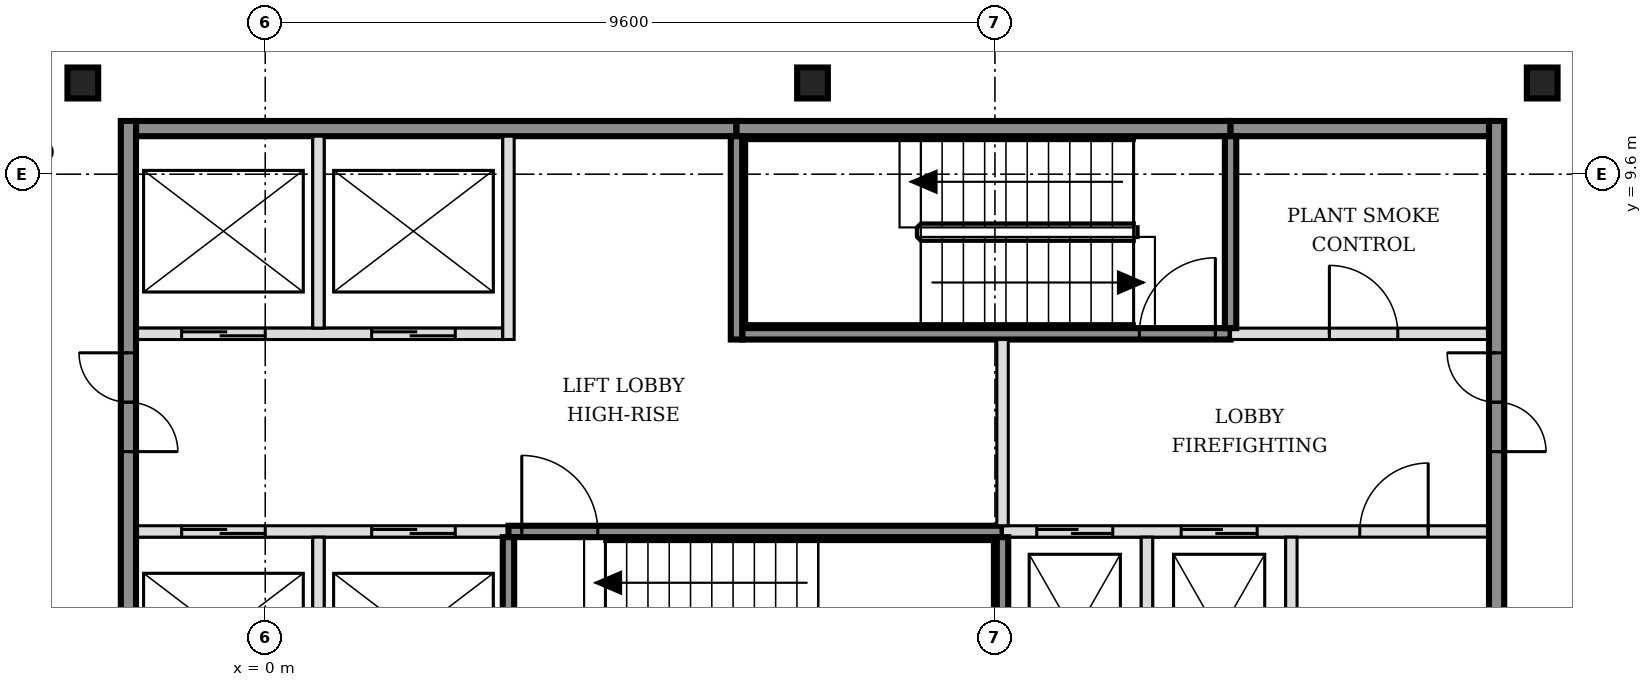
"""IFC4 building model, lengths in metres.
Left out: names, types, materials, properties, quantities, classifications, styles, units other than length and angle.
Written with IfcOpenShell. Run it as: python <this file> out.ifc"""

import sys

from ifc_helpers import new_model, si_unit, direction, frame, frame_2d, origin, origin_2d, place, context, subcontext, project, spatial, rectangle, i_section, extrude, element, fill, save


model = new_model("IFC4")
c1 = context("Model", 3, precision=1e-05, world=origin(), true_north=direction((0.0, 1.0)))
c2 = subcontext(c1, "Body", "Model", "MODEL_VIEW")
j1 = project(units=[si_unit("LENGTHUNIT", "METRE"), si_unit("PLANEANGLEUNIT", "RADIAN")], contexts=[c1])
p1 = place(None, origin())
s1 = spatial("IfcSite", under=j1, at=p1, CompositionType="ELEMENT")
p2 = place(p1, origin())
s2 = spatial("IfcBuilding", under=s1, at=p2, CompositionType="ELEMENT")
p3 = place(p2, frame((0.0, 0.0, 232.2)))
s3 = spatial("IfcBuildingStorey", under=s2, at=p3, CompositionType="ELEMENT", Elevation=232.2)
for number, where, z_axis, x_axis in (
    (1, (-2.4, 10.8, -0.15), (0.0, 0.0, 1.0), (1.0, 0.0, 0.0)),
    (2, (7.2, 10.8, -0.15), (0.0, 0.0, 1.0), (1.0, 0.0, 0.0)),
    (3, (16.8, 10.8, -0.15), (0.0, 0.0, 1.0), (1.0, 0.0, 0.0)),
):
    element("IfcColumn", number, at=place(p3, frame(where, z_axis=z_axis, x_axis=x_axis)), inside=s3, PredefinedType="COLUMN", context=c2, shape_type="SweptSolid", body=[
        extrude(i_section(OverallWidth=0.404, OverallDepth=0.407, WebThickness=0.027, FlangeThickness=0.044, FilletRadius=0.015, at=origin_2d()), origin(), (0.0, 0.0, 1.0), 3.6),
    ])
p4 = place(p3, frame((-1.7, 4.9, 0.0), z_axis=(0.0, 0.0, 1.0), x_axis=(1.0, 0.0, 0.0)))
e4 = element("IfcWall", 4, at=p4, inside=s3, PredefinedType="SOLIDWALL", context=c2, shape_type="SweptSolid", body=[
    extrude(rectangle(XDim=4.9, YDim=0.15, at=frame_2d((2.45, 0.0))), origin(), (0.0, 0.0, 1.0), 3.45),
])
p5 = place(p4, frame((0.6, 0.0, 0.0)))
e5 = element("IfcOpeningElement", 5, at=p5, cuts=e4, PredefinedType="OPENING", context=c2, shape_type="SweptSolid", body=[
    extrude(rectangle(XDim=1.1, YDim=2.1, at=frame_2d((0.55, 1.05))), frame((0.0, 0.085, 0.0), z_axis=(0.0, -1.0, 0.0), x_axis=(1.0, 0.0, 0.0)), (0.0, 0.0, 1.0), 0.17),
])
p6 = place(p4, frame((3.1, 0.0, 0.0)))
e6 = element("IfcOpeningElement", 6, at=p6, cuts=e4, PredefinedType="OPENING", context=c2, shape_type="SweptSolid", body=[
    extrude(rectangle(XDim=1.1, YDim=2.1, at=frame_2d((0.55, 1.05))), frame((0.0, 0.085, 0.0), z_axis=(0.0, -1.0, 0.0), x_axis=(1.0, 0.0, 0.0)), (0.0, 0.0, 1.0), 0.17),
])
p7 = place(p3, frame((3.2, 4.9, 0.0), z_axis=(0.0, 0.0, 1.0), x_axis=(1.0, 0.0, 0.0)))
e7 = element("IfcWall", 7, at=p7, inside=s3, PredefinedType="SOLIDWALL", context=c2, shape_type="SweptSolid", body=[
    extrude(rectangle(XDim=6.5, YDim=0.15, at=frame_2d((3.25, 0.0))), origin(), (0.0, 0.0, 1.0), 3.45),
])
p8 = place(p7, frame((0.175, 0.0, 0.0)))
e8 = element("IfcOpeningElement", 8, at=p8, cuts=e7, PredefinedType="OPENING", context=c2, shape_type="SweptSolid", body=[
    extrude(rectangle(XDim=1.0, YDim=2.1, at=frame_2d((0.5, 1.05))), frame((0.0, 0.085, 0.0), z_axis=(0.0, -1.0, 0.0), x_axis=(1.0, 0.0, 0.0)), (0.0, 0.0, 1.0), 0.17),
])
p9 = place(p3, frame((9.7, 4.9, 0.0), z_axis=(0.0, 0.0, 1.0), x_axis=(1.0, 0.0, 0.0)))
e9 = element("IfcWall", 9, at=p9, inside=s3, PredefinedType="SOLIDWALL", context=c2, shape_type="SweptSolid", body=[
    extrude(rectangle(XDim=6.4, YDim=0.15, at=frame_2d((3.2, 0.0))), origin(), (0.0, 0.0, 1.0), 3.45),
])
p10 = place(p9, frame((0.45, 0.0, 0.0)))
e10 = element("IfcOpeningElement", 10, at=p10, cuts=e9, PredefinedType="OPENING", context=c2, shape_type="SweptSolid", body=[
    extrude(rectangle(XDim=1.0, YDim=2.1, at=frame_2d((0.5, 1.05))), frame((0.0, 0.085, 0.0), z_axis=(0.0, -1.0, 0.0), x_axis=(1.0, 0.0, 0.0)), (0.0, 0.0, 1.0), 0.17),
])
p11 = place(p9, frame((2.35, 0.0, 0.0)))
e11 = element("IfcOpeningElement", 11, at=p11, cuts=e9, PredefinedType="OPENING", context=c2, shape_type="SweptSolid", body=[
    extrude(rectangle(XDim=1.0, YDim=2.1, at=frame_2d((0.5, 1.05))), frame((0.0, 0.085, 0.0), z_axis=(0.0, -1.0, 0.0), x_axis=(1.0, 0.0, 0.0)), (0.0, 0.0, 1.0), 0.17),
])
p12 = place(p9, frame((4.7, 0.0, 0.0)))
e12 = element("IfcOpeningElement", 12, at=p12, cuts=e9, PredefinedType="OPENING", context=c2, shape_type="SweptSolid", body=[
    extrude(rectangle(XDim=0.9, YDim=2.1, at=frame_2d((0.45, 1.05))), frame((0.0, 0.085, 0.0), z_axis=(0.0, -1.0, 0.0), x_axis=(1.0, 0.0, 0.0)), (0.0, 0.0, 1.0), 0.17),
])
p13 = place(p3, frame((-1.7, 7.5, 0.0), z_axis=(0.0, 0.0, 1.0), x_axis=(1.0, 0.0, 0.0)))
e13 = element("IfcWall", 13, at=p13, inside=s3, PredefinedType="SOLIDWALL", context=c2, shape_type="SweptSolid", body=[
    extrude(rectangle(XDim=4.825, YDim=0.15, at=frame_2d((2.413, 0.0))), origin(), (0.0, 0.0, 1.0), 3.45),
])
p14 = place(p13, frame((0.6, 0.0, 0.0)))
e14 = element("IfcOpeningElement", 14, at=p14, cuts=e13, PredefinedType="OPENING", context=c2, shape_type="SweptSolid", body=[
    extrude(rectangle(XDim=1.1, YDim=2.1, at=frame_2d((0.55, 1.05))), frame((0.0, 0.085, 0.0), z_axis=(0.0, -1.0, 0.0), x_axis=(1.0, 0.0, 0.0)), (0.0, 0.0, 1.0), 0.17),
])
p15 = place(p13, frame((3.1, 0.0, 0.0)))
e15 = element("IfcOpeningElement", 15, at=p15, cuts=e13, PredefinedType="OPENING", context=c2, shape_type="SweptSolid", body=[
    extrude(rectangle(XDim=1.1, YDim=2.1, at=frame_2d((0.55, 1.05))), frame((0.0, 0.085, 0.0), z_axis=(0.0, -1.0, 0.0), x_axis=(1.0, 0.0, 0.0)), (0.0, 0.0, 1.0), 0.17),
])
p16 = place(p3, frame((6.275, 7.5, 0.0), z_axis=(0.0, 0.0, 1.0), x_axis=(1.0, 0.0, 0.0)))
e16 = element("IfcWall", 16, at=p16, inside=s3, PredefinedType="SOLIDWALL", context=c2, shape_type="SweptSolid", body=[
    extrude(rectangle(XDim=6.425, YDim=0.15, at=frame_2d((3.212, 0.0))), origin(), (0.0, 0.0, 1.0), 3.45),
])
p17 = place(p16, frame((5.225, 0.0, 0.0)))
e17 = element("IfcOpeningElement", 17, at=p17, cuts=e16, PredefinedType="OPENING", context=c2, shape_type="SweptSolid", body=[
    extrude(rectangle(XDim=1.0, YDim=2.1, at=frame_2d((0.5, 1.05))), frame((0.0, 0.085, 0.0), z_axis=(0.0, -1.0, 0.0), x_axis=(1.0, 0.0, 0.0)), (0.0, 0.0, 1.0), 0.17),
])
p18 = place(p3, frame((12.7, 7.5, 0.0), z_axis=(0.0, 0.0, 1.0), x_axis=(1.0, 0.0, 0.0)))
e18 = element("IfcWall", 18, at=p18, inside=s3, PredefinedType="SOLIDWALL", context=c2, shape_type="SweptSolid", body=[
    extrude(rectangle(XDim=3.4, YDim=0.15, at=frame_2d((1.7, 0.0))), origin(), (0.0, 0.0, 1.0), 3.45),
])
p19 = place(p18, frame((1.3, 0.0, 0.0)))
e19 = element("IfcOpeningElement", 19, at=p19, cuts=e18, PredefinedType="OPENING", context=c2, shape_type="SweptSolid", body=[
    extrude(rectangle(XDim=0.9, YDim=2.1, at=frame_2d((0.45, 1.05))), frame((0.0, 0.085, 0.0), z_axis=(0.0, -1.0, 0.0), x_axis=(1.0, 0.0, 0.0)), (0.0, 0.0, 1.0), 0.17),
])
p20 = place(p3, frame((-1.7, 10.2, 0.0), z_axis=(0.0, 0.0, 1.0), x_axis=(1.0, 0.0, 0.0)))
e20 = element("IfcWall", 20, at=p20, inside=s3, PredefinedType="SOLIDWALL", context=c2, shape_type="SweptSolid", body=[
    extrude(rectangle(XDim=7.9, YDim=0.2, at=frame_2d((3.95, 0.0))), origin(), (0.0, 0.0, 1.0), 3.45),
])
p21 = place(p3, frame((6.2, 10.2, 0.0), z_axis=(0.0, 0.0, 1.0), x_axis=(1.0, 0.0, 0.0)))
e21 = element("IfcWall", 21, at=p21, inside=s3, PredefinedType="SOLIDWALL", context=c2, shape_type="SweptSolid", body=[
    extrude(rectangle(XDim=6.5, YDim=0.2, at=frame_2d((3.25, 0.0))), origin(), (0.0, 0.0, 1.0), 3.45),
])
p22 = place(p3, frame((12.7, 10.2, 0.0), z_axis=(0.0, 0.0, 1.0), x_axis=(1.0, 0.0, 0.0)))
e22 = element("IfcWall", 22, at=p22, inside=s3, PredefinedType="SOLIDWALL", context=c2, shape_type="SweptSolid", body=[
    extrude(rectangle(XDim=3.4, YDim=0.2, at=frame_2d((1.7, 0.0))), origin(), (0.0, 0.0, 1.0), 3.45),
])
p23 = place(p3, frame((-1.8, -5.5, 0.0), z_axis=(0.0, 0.0, 1.0), x_axis=(0.0, 1.0, 0.0)))
e23 = element("IfcWall", 23, at=p23, inside=s3, PredefinedType="SOLIDWALL", context=c2, shape_type="SweptSolid", body=[
    extrude(rectangle(XDim=15.8, YDim=0.2, at=frame_2d((7.9, 0.0))), origin(), (0.0, 0.0, 1.0), 3.45),
])
p24 = place(p23, frame((3.05, 0.0, 0.0)))
e24 = element("IfcOpeningElement", 24, at=p24, cuts=e23, PredefinedType="OPENING", context=c2, shape_type="SweptSolid", body=[
    extrude(rectangle(XDim=1.3, YDim=2.1, at=frame_2d((0.65, 1.05))), frame((0.0, 0.11, 0.0), z_axis=(0.0, -1.0, 0.0), x_axis=(1.0, 0.0, 0.0)), (0.0, 0.0, 1.0), 0.22),
])
p25 = place(p23, frame((11.45, 0.0, 0.0)))
e25 = element("IfcOpeningElement", 25, at=p25, cuts=e23, PredefinedType="OPENING", context=c2, shape_type="SweptSolid", body=[
    extrude(rectangle(XDim=1.3, YDim=2.1, at=frame_2d((0.65, 1.05))), frame((0.0, 0.11, 0.0), z_axis=(0.0, -1.0, 0.0), x_axis=(1.0, 0.0, 0.0)), (0.0, 0.0, 1.0), 0.22),
])
p26 = place(p3, frame((0.7, 2.275, 0.0), z_axis=(0.0, 0.0, 1.0), x_axis=(0.0, 1.0, 0.0)))
e26 = element("IfcWall", 26, at=p26, inside=s3, PredefinedType="SOLIDWALL", context=c2, shape_type="SweptSolid", body=[
    extrude(rectangle(XDim=2.55, YDim=0.15, at=frame_2d((1.275, 0.0))), origin(), (0.0, 0.0, 1.0), 3.45),
])
p27 = place(p3, frame((0.7, 7.575, 0.0), z_axis=(0.0, 0.0, 1.0), x_axis=(0.0, 1.0, 0.0)))
e27 = element("IfcWall", 27, at=p27, inside=s3, PredefinedType="SOLIDWALL", context=c2, shape_type="SweptSolid", body=[
    extrude(rectangle(XDim=2.525, YDim=0.15, at=frame_2d((1.263, 0.0))), origin(), (0.0, 0.0, 1.0), 3.45),
])
p28 = place(p3, frame((3.2, 2.275, 0.0), z_axis=(0.0, 0.0, 1.0), x_axis=(0.0, 1.0, 0.0)))
e28 = element("IfcWall", 28, at=p28, inside=s3, PredefinedType="SOLIDWALL", context=c2, shape_type="SweptSolid", body=[
    extrude(rectangle(XDim=2.55, YDim=0.15, at=frame_2d((1.275, 0.0))), origin(), (0.0, 0.0, 1.0), 3.45),
])
for number, where, z_axis, x_axis in (
    (29, (3.2, 7.425, 0.0), (0.0, 0.0, 1.0), (0.0, 1.0, 0.0)),
    (30, (6.2, 7.425, 0.0), (0.0, 0.0, 1.0), (0.0, 1.0, 0.0)),
):
    element("IfcWall", number, at=place(p3, frame(where, z_axis=z_axis, x_axis=x_axis)), inside=s3, PredefinedType="SOLIDWALL", context=c2, shape_type="SweptSolid", body=[
        extrude(rectangle(XDim=2.675, YDim=0.15, at=frame_2d((1.337, 0.0))), origin(), (0.0, 0.0, 1.0), 3.45),
    ])
p29 = place(p3, frame((9.7, 2.275, 0.0), z_axis=(0.0, 0.0, 1.0), x_axis=(0.0, 1.0, 0.0)))
e31 = element("IfcWall", 31, at=p29, inside=s3, PredefinedType="SOLIDWALL", context=c2, shape_type="SweptSolid", body=[
    extrude(rectangle(XDim=2.55, YDim=0.15, at=frame_2d((1.275, 0.0))), origin(), (0.0, 0.0, 1.0), 3.45),
])
p30 = place(p3, frame((9.7, 4.975, 0.0), z_axis=(0.0, 0.0, 1.0), x_axis=(0.0, 1.0, 0.0)))
e32 = element("IfcWall", 32, at=p30, inside=s3, PredefinedType="SOLIDWALL", context=c2, shape_type="SweptSolid", body=[
    extrude(rectangle(XDim=2.45, YDim=0.15, at=frame_2d((1.225, 0.0))), origin(), (0.0, 0.0, 1.0), 3.45),
])
p31 = place(p3, frame((11.6, 2.275, 0.0), z_axis=(0.0, 0.0, 1.0), x_axis=(0.0, 1.0, 0.0)))
e33 = element("IfcWall", 33, at=p31, inside=s3, PredefinedType="SOLIDWALL", context=c2, shape_type="SweptSolid", body=[
    extrude(rectangle(XDim=2.55, YDim=0.15, at=frame_2d((1.275, 0.0))), origin(), (0.0, 0.0, 1.0), 3.45),
])
p32 = place(p3, frame((12.7, 7.575, 0.0), z_axis=(0.0, 0.0, 1.0), x_axis=(0.0, 1.0, 0.0)))
e34 = element("IfcWall", 34, at=p32, inside=s3, PredefinedType="SOLIDWALL", context=c2, shape_type="SweptSolid", body=[
    extrude(rectangle(XDim=2.525, YDim=0.15, at=frame_2d((1.263, 0.0))), origin(), (0.0, 0.0, 1.0), 3.45),
])
p33 = place(p3, frame((13.5, 2.275, 0.0), z_axis=(0.0, 0.0, 1.0), x_axis=(0.0, 1.0, 0.0)))
e35 = element("IfcWall", 35, at=p33, inside=s3, PredefinedType="SOLIDWALL", context=c2, shape_type="SweptSolid", body=[
    extrude(rectangle(XDim=2.55, YDim=0.15, at=frame_2d((1.275, 0.0))), origin(), (0.0, 0.0, 1.0), 3.45),
])
p34 = place(p3, frame((16.2, -5.5, 0.0), z_axis=(0.0, 0.0, 1.0), x_axis=(0.0, 1.0, 0.0)))
e36 = element("IfcWall", 36, at=p34, inside=s3, PredefinedType="SOLIDWALL", context=c2, shape_type="SweptSolid", body=[
    extrude(rectangle(XDim=15.8, YDim=0.2, at=frame_2d((7.9, 0.0))), origin(), (0.0, 0.0, 1.0), 3.45),
])
p35 = place(p34, frame((3.05, 0.0, 0.0)))
e37 = element("IfcOpeningElement", 37, at=p35, cuts=e36, PredefinedType="OPENING", context=c2, shape_type="SweptSolid", body=[
    extrude(rectangle(XDim=1.3, YDim=2.1, at=frame_2d((0.65, 1.05))), frame((0.0, 0.11, 0.0), z_axis=(0.0, -1.0, 0.0), x_axis=(1.0, 0.0, 0.0)), (0.0, 0.0, 1.0), 0.22),
])
p36 = place(p34, frame((11.45, 0.0, 0.0)))
e38 = element("IfcOpeningElement", 38, at=p36, cuts=e36, PredefinedType="OPENING", context=c2, shape_type="SweptSolid", body=[
    extrude(rectangle(XDim=1.3, YDim=2.1, at=frame_2d((0.65, 1.05))), frame((0.0, 0.11, 0.0), z_axis=(0.0, -1.0, 0.0), x_axis=(1.0, 0.0, 0.0)), (0.0, 0.0, 1.0), 0.22),
])
p37 = place(p5, origin())
e39 = element("IfcDoor", 39, at=p37, inside=s3, OperationType="DOUBLE_DOOR_SLIDING", PredefinedType="DOOR", context=c2, shape_type="SweptSolid", body=[
    extrude(rectangle(XDim=1.1, YDim=2.1, at=frame_2d((0.55, 1.05))), frame((0.0, 0.025, 0.0), z_axis=(0.0, -1.0, 0.0), x_axis=(1.0, 0.0, 0.0)), (0.0, 0.0, 1.0), 0.05),
])
fill(e5, e39)
p38 = place(p6, origin())
e40 = element("IfcDoor", 40, at=p38, inside=s3, OperationType="DOUBLE_DOOR_SLIDING", PredefinedType="DOOR", context=c2, shape_type="SweptSolid", body=[
    extrude(rectangle(XDim=1.1, YDim=2.1, at=frame_2d((0.55, 1.05))), frame((0.0, 0.025, 0.0), z_axis=(0.0, -1.0, 0.0), x_axis=(1.0, 0.0, 0.0)), (0.0, 0.0, 1.0), 0.05),
])
fill(e6, e40)
p39 = place(p14, origin())
e41 = element("IfcDoor", 41, at=p39, inside=s3, OperationType="DOUBLE_DOOR_SLIDING", PredefinedType="DOOR", context=c2, shape_type="SweptSolid", body=[
    extrude(rectangle(XDim=1.1, YDim=2.1, at=frame_2d((0.55, 1.05))), frame((0.0, 0.025, 0.0), z_axis=(0.0, -1.0, 0.0), x_axis=(1.0, 0.0, 0.0)), (0.0, 0.0, 1.0), 0.05),
])
fill(e14, e41)
p40 = place(p15, origin())
e42 = element("IfcDoor", 42, at=p40, inside=s3, OperationType="DOUBLE_DOOR_SLIDING", PredefinedType="DOOR", context=c2, shape_type="SweptSolid", body=[
    extrude(rectangle(XDim=1.1, YDim=2.1, at=frame_2d((0.55, 1.05))), frame((0.0, 0.025, 0.0), z_axis=(0.0, -1.0, 0.0), x_axis=(1.0, 0.0, 0.0)), (0.0, 0.0, 1.0), 0.05),
])
fill(e15, e42)
p41 = place(p10, origin())
e43 = element("IfcDoor", 43, at=p41, inside=s3, OperationType="DOUBLE_DOOR_SLIDING", PredefinedType="DOOR", context=c2, shape_type="SweptSolid", body=[
    extrude(rectangle(XDim=1.0, YDim=2.1, at=frame_2d((0.5, 1.05))), frame((0.0, 0.025, 0.0), z_axis=(0.0, -1.0, 0.0), x_axis=(1.0, 0.0, 0.0)), (0.0, 0.0, 1.0), 0.05),
])
fill(e10, e43)
p42 = place(p11, origin())
e44 = element("IfcDoor", 44, at=p42, inside=s3, OperationType="DOUBLE_DOOR_SLIDING", PredefinedType="DOOR", context=c2, shape_type="SweptSolid", body=[
    extrude(rectangle(XDim=1.0, YDim=2.1, at=frame_2d((0.5, 1.05))), frame((0.0, 0.025, 0.0), z_axis=(0.0, -1.0, 0.0), x_axis=(1.0, 0.0, 0.0)), (0.0, 0.0, 1.0), 0.05),
])
fill(e11, e44)
p43 = place(p8, origin())
e45 = element("IfcDoor", 45, at=p43, inside=s3, OperationType="SINGLE_SWING_LEFT", PredefinedType="DOOR", context=c2, shape_type="SweptSolid", body=[
    extrude(rectangle(XDim=1.0, YDim=2.1, at=frame_2d((0.5, 1.05))), frame((0.0, 0.025, 0.0), z_axis=(0.0, -1.0, 0.0), x_axis=(1.0, 0.0, 0.0)), (0.0, 0.0, 1.0), 0.05),
])
fill(e8, e45)
p44 = place(p17, origin())
e46 = element("IfcDoor", 46, at=p44, inside=s3, OperationType="SINGLE_SWING_RIGHT", PredefinedType="DOOR", context=c2, shape_type="SweptSolid", body=[
    extrude(rectangle(XDim=1.0, YDim=2.1, at=frame_2d((0.5, 1.05))), frame((0.0, 0.025, 0.0), z_axis=(0.0, -1.0, 0.0), x_axis=(1.0, 0.0, 0.0)), (0.0, 0.0, 1.0), 0.05),
])
fill(e17, e46)
p45 = place(p25, origin())
e47 = element("IfcDoor", 47, at=p45, inside=s3, OperationType="DOUBLE_DOOR_SINGLE_SWING", PredefinedType="DOOR", context=c2, shape_type="SweptSolid", body=[
    extrude(rectangle(XDim=1.3, YDim=2.1, at=frame_2d((0.65, 1.05))), frame((0.0, 0.025, 0.0), z_axis=(0.0, -1.0, 0.0), x_axis=(1.0, 0.0, 0.0)), (0.0, 0.0, 1.0), 0.05),
])
fill(e25, e47)
p46 = place(p36, origin())
e48 = element("IfcDoor", 48, at=p46, inside=s3, OperationType="DOUBLE_DOOR_SINGLE_SWING", PredefinedType="DOOR", context=c2, shape_type="SweptSolid", body=[
    extrude(rectangle(XDim=1.3, YDim=2.1, at=frame_2d((0.65, 1.05))), frame((0.0, 0.025, 0.0), z_axis=(0.0, -1.0, 0.0), x_axis=(1.0, 0.0, 0.0)), (0.0, 0.0, 1.0), 0.05),
])
fill(e38, e48)
p47 = place(p12, origin())
e49 = element("IfcDoor", 49, at=p47, inside=s3, OperationType="SINGLE_SWING_RIGHT", PredefinedType="DOOR", context=c2, shape_type="SweptSolid", body=[
    extrude(rectangle(XDim=0.9, YDim=2.1, at=frame_2d((0.45, 1.05))), frame((0.0, 0.025, 0.0), z_axis=(0.0, -1.0, 0.0), x_axis=(1.0, 0.0, 0.0)), (0.0, 0.0, 1.0), 0.05),
])
fill(e12, e49)
p48 = place(p19, origin())
e50 = element("IfcDoor", 50, at=p48, inside=s3, OperationType="SINGLE_SWING_LEFT", PredefinedType="DOOR", context=c2, shape_type="SweptSolid", body=[
    extrude(rectangle(XDim=0.9, YDim=2.1, at=frame_2d((0.45, 1.05))), frame((0.0, 0.025, 0.0), z_axis=(0.0, -1.0, 0.0), x_axis=(1.0, 0.0, 0.0)), (0.0, 0.0, 1.0), 0.05),
])
fill(e19, e50)
save(model, sys.argv[1])
